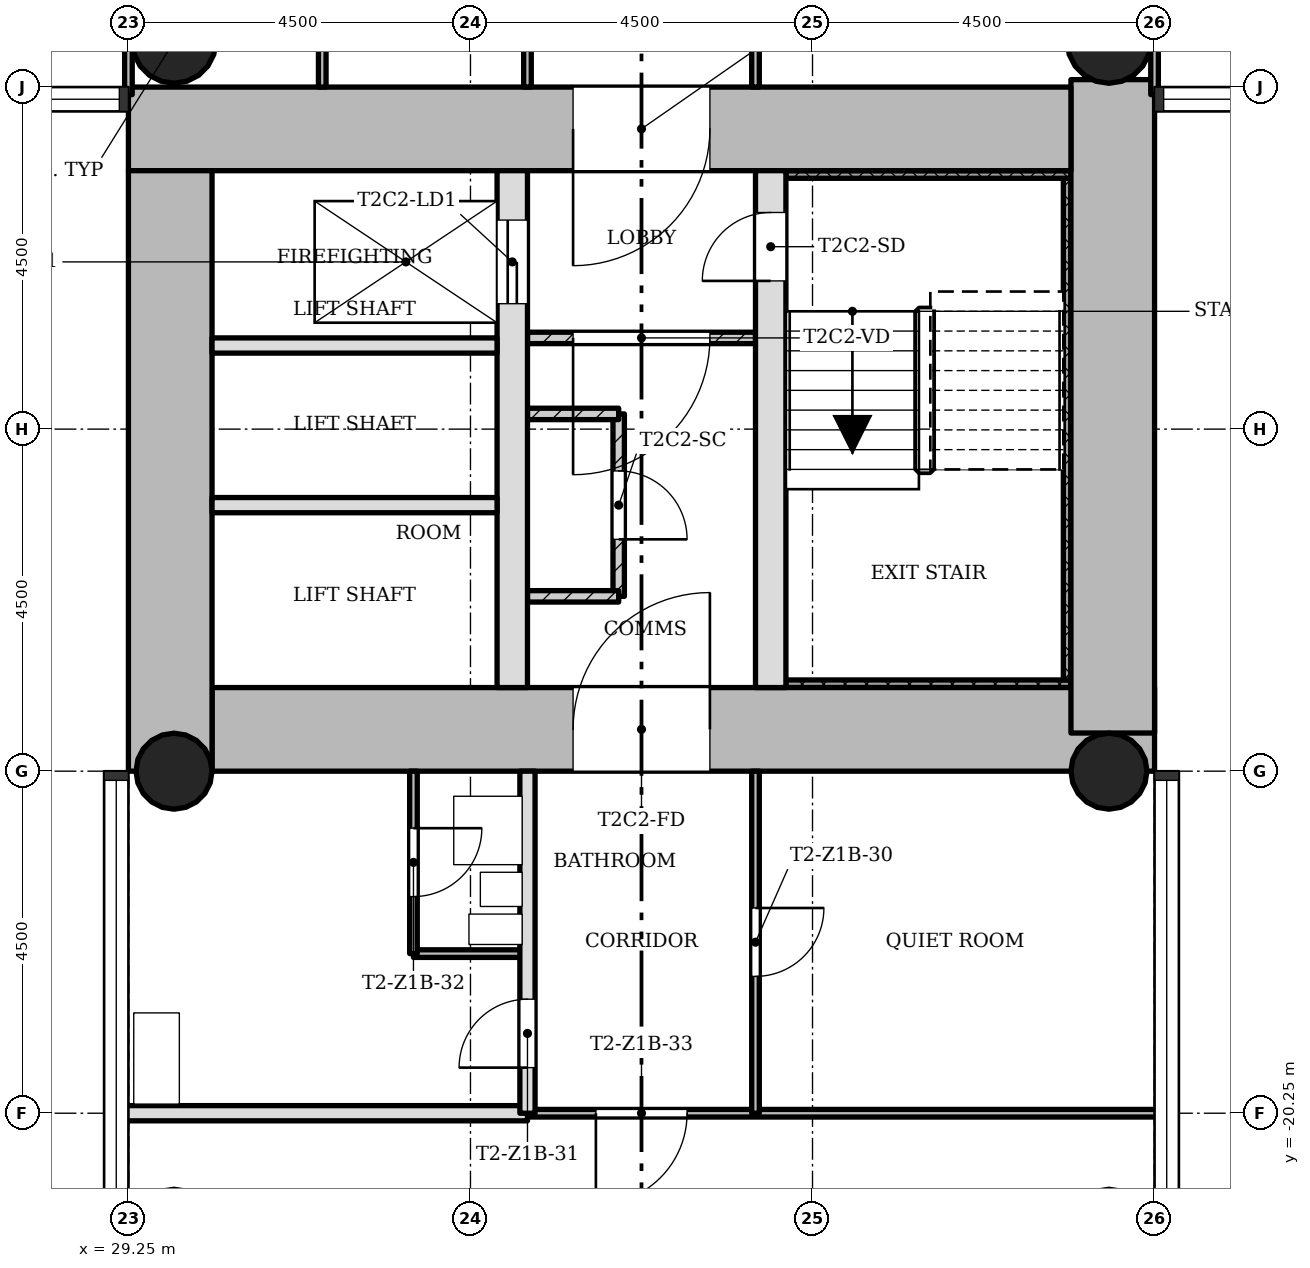
"""IFC4 building model, lengths in metres.
Left out: names, types, materials, properties, quantities, classifications, styles, units other than length and angle.
Written with IfcOpenShell. Run it as: python <this file> out.ifc"""

import sys

from ifc_helpers import new_model, si_unit, direction, frame, frame_2d, origin, origin_2d, place, context, subcontext, project, spatial, rectangle, hollow_circle, extrude, element, fill, save


model = new_model("IFC4")
c1 = context("Model", 3, precision=1e-05, world=origin(), true_north=direction((0.0, 1.0)))
c2 = subcontext(c1, "Body", "Model", "MODEL_VIEW")
j1 = project(units=[si_unit("LENGTHUNIT", "METRE"), si_unit("PLANEANGLEUNIT", "RADIAN")], contexts=[c1])
p1 = place(None, origin())
s1 = spatial("IfcSite", under=j1, at=p1, CompositionType="ELEMENT")
p2 = place(p1, origin())
s2 = spatial("IfcBuilding", under=s1, at=p2, CompositionType="ELEMENT")
p3 = place(p2, frame((0.0, 0.0, 34.7)))
s3 = spatial("IfcBuildingStorey", under=s2, at=p3, CompositionType="ELEMENT", Elevation=34.7)
p4 = place(p3, frame((30.35, -15.2, 0.0), z_axis=(0.0, 0.0, 1.0), x_axis=(1.0, 0.0, 0.0)))
e1 = element("IfcWall", 1, at=p4, inside=s3, PredefinedType="SHEAR", context=c2, shape_type="SweptSolid", body=[
    extrude(rectangle(XDim=12.4, YDim=1.1, at=frame_2d((6.2, 0.0))), origin(), (0.0, 0.0, 1.0), 3.4),
])
p5 = place(p4, frame((4.75, 0.0, 0.0)))
e2 = element("IfcOpeningElement", 2, at=p5, cuts=e1, PredefinedType="OPENING", context=c2, shape_type="SweptSolid", body=[
    extrude(rectangle(XDim=1.8, YDim=2.1, at=frame_2d((0.9, 1.05))), frame((0.0, 0.56, 0.0), z_axis=(0.0, -1.0, 0.0), x_axis=(1.0, 0.0, 0.0)), (0.0, 0.0, 1.0), 1.12),
])
p6 = place(p3, frame((42.2, -15.248, 0.0), z_axis=(0.0, 0.0, 1.0), x_axis=(0.0, 1.0, 0.0)))
e3 = element("IfcWall", 3, at=p6, inside=s3, PredefinedType="SHEAR", context=c2, shape_type="SweptSolid", body=[
    extrude(rectangle(XDim=8.596, YDim=1.1, at=frame_2d((4.298, 0.0))), origin(), (0.0, 0.0, 1.0), 3.4),
])
p7 = place(p3, frame((41.65, -7.3, 0.0), z_axis=(0.0, 0.0, 1.0), x_axis=(-1.0, 0.0, 0.0)))
e4 = element("IfcWall", 4, at=p7, inside=s3, PredefinedType="SHEAR", context=c2, shape_type="SweptSolid", body=[
    extrude(rectangle(XDim=12.4, YDim=1.1, at=frame_2d((6.2, 0.0))), origin(), (0.0, 0.0, 1.0), 3.4),
])
p8 = place(p7, frame((4.75, 0.0, 0.0)))
e5 = element("IfcOpeningElement", 5, at=p8, cuts=e4, PredefinedType="OPENING", context=c2, shape_type="SweptSolid", body=[
    extrude(rectangle(XDim=1.8, YDim=2.1, at=frame_2d((0.9, 1.05))), frame((0.0, 0.56, 0.0), z_axis=(0.0, -1.0, 0.0), x_axis=(1.0, 0.0, 0.0)), (0.0, 0.0, 1.0), 1.12),
])
p9 = place(p3, frame((29.8, -7.85, 0.0), z_axis=(0.0, 0.0, 1.0), x_axis=(0.0, -1.0, 0.0)))
e6 = element("IfcWall", 6, at=p9, inside=s3, PredefinedType="SHEAR", context=c2, shape_type="SweptSolid", body=[
    extrude(rectangle(XDim=7.9, YDim=1.1, at=frame_2d((3.95, 0.0))), origin(), (0.0, 0.0, 1.0), 3.4),
])
p10 = place(p3, frame((34.3, -14.65, 0.0), z_axis=(0.0, 0.0, 1.0), x_axis=(0.0, 1.0, 0.0)))
e7 = element("IfcWall", 7, at=p10, inside=s3, PredefinedType="SHEAR", context=c2, shape_type="SweptSolid", body=[
    extrude(rectangle(XDim=6.8, YDim=0.4, at=frame_2d((3.4, 0.0))), origin(), (0.0, 0.0, 1.0), 3.4),
])
p11 = place(p10, frame((5.05, 0.0, 0.0)))
e8 = element("IfcOpeningElement", 8, at=p11, cuts=e7, PredefinedType="OPENING", context=c2, shape_type="SweptSolid", body=[
    extrude(rectangle(XDim=1.1, YDim=2.1, at=frame_2d((0.55, 1.05))), frame((0.0, 0.21, 0.0), z_axis=(0.0, -1.0, 0.0), x_axis=(1.0, 0.0, 0.0)), (0.0, 0.0, 1.0), 0.42),
])
p12 = place(p3, frame((37.7, -14.65, 0.0), z_axis=(0.0, 0.0, 1.0), x_axis=(0.0, 1.0, 0.0)))
e9 = element("IfcWall", 9, at=p12, inside=s3, PredefinedType="SHEAR", context=c2, shape_type="SweptSolid", body=[
    extrude(rectangle(XDim=6.8, YDim=0.4, at=frame_2d((3.4, 0.0))), origin(), (0.0, 0.0, 1.0), 3.4),
])
p13 = place(p12, frame((5.35, 0.0, 0.0)))
e10 = element("IfcOpeningElement", 10, at=p13, cuts=e9, PredefinedType="OPENING", context=c2, shape_type="SweptSolid", body=[
    extrude(rectangle(XDim=0.9, YDim=2.1, at=frame_2d((0.45, 1.05))), frame((0.0, 0.21, 0.0), z_axis=(0.0, -1.0, 0.0), x_axis=(1.0, 0.0, 0.0)), (0.0, 0.0, 1.0), 0.42),
])
for number, where, z_axis, x_axis in (
    (11, (42.15, -15.75, 0.0), (0.0, 0.0, 1.0), (1.0, 0.0, 0.0)),
    (12, (29.85, -15.75, 0.0), (0.0, 0.0, 1.0), (1.0, 0.0, 0.0)),
):
    element("IfcColumn", number, at=place(p3, frame(where, z_axis=z_axis, x_axis=x_axis)), inside=s3, PredefinedType="COLUMN", context=c2, shape_type="SweptSolid", body=[
        extrude(hollow_circle(Radius=0.5, WallThickness=0.036, at=origin_2d()), origin(), (0.0, 0.0, 1.0), 3.4),
    ])
for number, where, z_axis, x_axis in (
    (13, (42.15, -6.15, 0.0), (0.0, 0.0, 1.0), (1.0, 0.0, 0.0)),
    (14, (29.85, -6.15, 0.0), (0.0, 0.0, 1.0), (1.0, 0.0, 0.0)),
):
    element("IfcColumn", number, at=place(p3, frame(where, z_axis=z_axis, x_axis=x_axis)), inside=s3, PredefinedType="COLUMN", context=c2, shape_type="SweptSolid", body=[
        extrude(hollow_circle(Radius=0.55, WallThickness=0.04, at=origin_2d()), origin(), (0.0, 0.0, 1.0), 3.4),
    ])
p14 = place(p3, frame((34.5, -10.05, 0.0), z_axis=(0.0, 0.0, 1.0), x_axis=(1.0, 0.0, 0.0)))
e15 = element("IfcWall", 15, at=p14, inside=s3, PredefinedType="PARTITIONING", context=c2, shape_type="SweptSolid", body=[
    extrude(rectangle(XDim=3.0, YDim=0.15, at=frame_2d((1.5, 0.0))), origin(), (0.0, 0.0, 1.0), 3.0),
])
p15 = place(p14, frame((0.6, 0.0, 0.0)))
e16 = element("IfcOpeningElement", 16, at=p15, cuts=e15, PredefinedType="OPENING", context=c2, shape_type="SweptSolid", body=[
    extrude(rectangle(XDim=1.8, YDim=2.1, at=frame_2d((0.9, 1.05))), frame((0.0, 0.085, 0.0), z_axis=(0.0, -1.0, 0.0), x_axis=(1.0, 0.0, 0.0)), (0.0, 0.0, 1.0), 0.17),
])
for number, where, z_axis, x_axis in (
    (17, (30.35, -10.15, 0.0), (0.0, 0.0, 1.0), (1.0, 0.0, 0.0)),
    (18, (30.35, -12.25, 0.0), (0.0, 0.0, 1.0), (1.0, 0.0, 0.0)),
):
    element("IfcWall", number, at=place(p3, frame(where, z_axis=z_axis, x_axis=x_axis)), inside=s3, PredefinedType="SOLIDWALL", context=c2, shape_type="SweptSolid", body=[
        extrude(rectangle(XDim=3.75, YDim=0.2, at=frame_2d((1.875, 0.0))), origin(), (0.0, 0.0, 1.0), 3.0),
    ])
p16 = place(p3, frame((35.7, -11.05, 0.0), z_axis=(0.0, 0.0, 1.0), x_axis=(0.0, -1.0, 0.0)))
e19 = element("IfcWall", 19, at=p16, inside=s3, PredefinedType="PARTITIONING", context=c2, shape_type="SweptSolid", body=[
    extrude(rectangle(XDim=2.4, YDim=0.15, at=frame_2d((1.2, 0.0))), origin(), (0.0, 0.0, 1.0), 3.0),
])
p17 = place(p16, frame((0.75, 0.0, 0.0)))
e20 = element("IfcOpeningElement", 20, at=p17, cuts=e19, PredefinedType="OPENING", context=c2, shape_type="SweptSolid", body=[
    extrude(rectangle(XDim=0.9, YDim=2.1, at=frame_2d((0.45, 1.05))), frame((0.0, 0.085, 0.0), z_axis=(0.0, -1.0, 0.0), x_axis=(1.0, 0.0, 0.0)), (0.0, 0.0, 1.0), 0.17),
])
for number, where, z_axis, x_axis in (
    (21, (35.7, -11.05, 0.0), (0.0, 0.0, 1.0), (-1.0, 0.0, 0.0)),
    (22, (35.7, -13.45, 0.0), (0.0, 0.0, 1.0), (-1.0, 0.0, 0.0)),
):
    element("IfcWall", number, at=place(p3, frame(where, z_axis=z_axis, x_axis=x_axis)), inside=s3, PredefinedType="PARTITIONING", context=c2, shape_type="SweptSolid", body=[
        extrude(rectangle(XDim=1.2, YDim=0.15, at=frame_2d((0.6, 0.0))), origin(), (0.0, 0.0, 1.0), 3.0),
    ])
p18 = place(p3, frame((42.85, -20.25, 0.0), z_axis=(0.0, 0.0, 1.0), x_axis=(-1.0, 0.0, 0.0)))
e23 = element("IfcWall", 23, at=p18, inside=s3, PredefinedType="PARTITIONING", context=c2, shape_type="SweptSolid", body=[
    extrude(rectangle(XDim=8.35, YDim=0.1, at=frame_2d((4.175, 0.0))), origin(), (0.0, 0.0, 1.0), 3.0),
])
p19 = place(p18, frame((6.25, 0.0, 0.0)))
e24 = element("IfcOpeningElement", 24, at=p19, cuts=e23, PredefinedType="OPENING", context=c2, shape_type="SweptSolid", body=[
    extrude(rectangle(XDim=1.2, YDim=2.1, at=frame_2d((0.6, 1.05))), frame((0.0, 0.06, 0.0), z_axis=(0.0, -1.0, 0.0), x_axis=(1.0, 0.0, 0.0)), (0.0, 0.0, 1.0), 0.12),
])
p20 = place(p3, frame((34.5, -20.25, 0.0), z_axis=(0.0, 0.0, 1.0), x_axis=(-1.0, 0.0, 0.0)))
e25 = element("IfcWall", 25, at=p20, inside=s3, PredefinedType="SOLIDWALL", context=c2, shape_type="SweptSolid", body=[
    extrude(rectangle(XDim=5.35, YDim=0.2, at=frame_2d((2.675, 0.0))), origin(), (0.0, 0.0, 1.0), 3.0),
])
p21 = place(p3, frame((34.5, -18.15, 0.0), z_axis=(0.0, 0.0, 1.0), x_axis=(-1.0, 0.0, 0.0)))
e26 = element("IfcWall", 26, at=p21, inside=s3, PredefinedType="PARTITIONING", context=c2, shape_type="SweptSolid", body=[
    extrude(rectangle(XDim=1.5, YDim=0.1, at=frame_2d((0.75, 0.0))), origin(), (0.0, 0.0, 1.0), 3.0),
])
p22 = place(p3, frame((42.75, -6.85, 0.0), z_axis=(0.0, 0.0, 1.0), x_axis=(0.0, 1.0, 0.0)))
e27 = element("IfcWall", 27, at=p22, inside=s3, PredefinedType="PARTITIONING", context=c2, shape_type="SweptSolid", body=[
    extrude(rectangle(XDim=5.95, YDim=0.1, at=frame_2d((2.975, 0.0))), origin(), (0.0, 0.0, 1.0), 3.0),
])
p23 = place(p3, frame((37.5, -20.25, 0.0), z_axis=(0.0, 0.0, 1.0), x_axis=(0.0, 1.0, 0.0)))
e28 = element("IfcWall", 28, at=p23, inside=s3, PredefinedType="PARTITIONING", context=c2, shape_type="SweptSolid", body=[
    extrude(rectangle(XDim=4.5, YDim=0.1, at=frame_2d((2.25, 0.0))), origin(), (0.0, 0.0, 1.0), 3.0),
])
p24 = place(p23, frame((1.8, 0.0, 0.0)))
e29 = element("IfcOpeningElement", 29, at=p24, cuts=e28, PredefinedType="OPENING", context=c2, shape_type="SweptSolid", body=[
    extrude(rectangle(XDim=0.9, YDim=2.1, at=frame_2d((0.45, 1.05))), frame((0.0, 0.06, 0.0), z_axis=(0.0, -1.0, 0.0), x_axis=(1.0, 0.0, 0.0)), (0.0, 0.0, 1.0), 0.12),
])
p25 = place(p3, frame((37.5, -6.75, 0.0), z_axis=(0.0, 0.0, 1.0), x_axis=(0.0, 1.0, 0.0)))
e30 = element("IfcWall", 30, at=p25, inside=s3, PredefinedType="PARTITIONING", context=c2, shape_type="SweptSolid", body=[
    extrude(rectangle(XDim=5.85, YDim=0.1, at=frame_2d((2.925, 0.0))), origin(), (0.0, 0.0, 1.0), 3.0),
])
p26 = place(p25, frame((1.575, 0.0, 0.0)))
e31 = element("IfcOpeningElement", 31, at=p26, cuts=e30, PredefinedType="OPENING", context=c2, shape_type="SweptSolid", body=[
    extrude(rectangle(XDim=0.9, YDim=2.1, at=frame_2d((0.45, 1.05))), frame((0.0, 0.06, 0.0), z_axis=(0.0, -1.0, 0.0), x_axis=(1.0, 0.0, 0.0)), (0.0, 0.0, 1.0), 0.12),
])
p27 = place(p3, frame((34.5, -6.75, 0.0), z_axis=(0.0, 0.0, 1.0), x_axis=(0.0, 1.0, 0.0)))
e32 = element("IfcWall", 32, at=p27, inside=s3, PredefinedType="PARTITIONING", context=c2, shape_type="SweptSolid", body=[
    extrude(rectangle(XDim=5.85, YDim=0.1, at=frame_2d((2.925, 0.0))), origin(), (0.0, 0.0, 1.0), 3.0),
])
p28 = place(p27, frame((2.475, 0.0, 0.0)))
e33 = element("IfcOpeningElement", 33, at=p28, cuts=e32, PredefinedType="OPENING", context=c2, shape_type="SweptSolid", body=[
    extrude(rectangle(XDim=0.9, YDim=2.1, at=frame_2d((0.45, 1.05))), frame((0.0, 0.06, 0.0), z_axis=(0.0, -1.0, 0.0), x_axis=(1.0, 0.0, 0.0)), (0.0, 0.0, 1.0), 0.12),
])
p29 = place(p3, frame((34.5, -20.25, 0.0), z_axis=(0.0, 0.0, 1.0), x_axis=(0.0, 1.0, 0.0)))
e34 = element("IfcWall", 34, at=p29, inside=s3, PredefinedType="SOLIDWALL", context=c2, shape_type="SweptSolid", body=[
    extrude(rectangle(XDim=4.5, YDim=0.2, at=frame_2d((2.25, 0.0))), origin(), (0.0, 0.0, 1.0), 3.0),
])
p30 = place(p29, frame((0.6, 0.0, 0.0)))
e35 = element("IfcOpeningElement", 35, at=p30, cuts=e34, PredefinedType="OPENING", context=c2, shape_type="SweptSolid", body=[
    extrude(rectangle(XDim=0.9, YDim=2.1, at=frame_2d((0.45, 1.05))), frame((0.0, 0.11, 0.0), z_axis=(0.0, -1.0, 0.0), x_axis=(1.0, 0.0, 0.0)), (0.0, 0.0, 1.0), 0.22),
])
p31 = place(p3, frame((33.0, -18.15, 0.0), z_axis=(0.0, 0.0, 1.0), x_axis=(0.0, 1.0, 0.0)))
e36 = element("IfcWall", 36, at=p31, inside=s3, PredefinedType="PARTITIONING", context=c2, shape_type="SweptSolid", body=[
    extrude(rectangle(XDim=2.4, YDim=0.1, at=frame_2d((1.2, 0.0))), origin(), (0.0, 0.0, 1.0), 3.0),
])
p32 = place(p31, frame((0.75, 0.0, 0.0)))
e37 = element("IfcOpeningElement", 37, at=p32, cuts=e36, PredefinedType="OPENING", context=c2, shape_type="SweptSolid", body=[
    extrude(rectangle(XDim=0.9, YDim=2.1, at=frame_2d((0.45, 1.05))), frame((0.0, 0.06, 0.0), z_axis=(0.0, -1.0, 0.0), x_axis=(1.0, 0.0, 0.0)), (0.0, 0.0, 1.0), 0.12),
])
p33 = place(p3, frame((31.8, -6.75, 0.0), z_axis=(0.0, 0.0, 1.0), x_axis=(0.0, 1.0, 0.0)))
e38 = element("IfcWall", 38, at=p33, inside=s3, PredefinedType="PARTITIONING", context=c2, shape_type="SweptSolid", body=[
    extrude(rectangle(XDim=5.85, YDim=0.1, at=frame_2d((2.925, 0.0))), origin(), (0.0, 0.0, 1.0), 3.0),
])
p34 = place(p3, frame((29.25, -6.85, 0.0), z_axis=(0.0, 0.0, 1.0), x_axis=(0.0, 1.0, 0.0)))
e39 = element("IfcWall", 39, at=p34, inside=s3, PredefinedType="PARTITIONING", context=c2, shape_type="SweptSolid", body=[
    extrude(rectangle(XDim=5.95, YDim=0.1, at=frame_2d((2.975, 0.0))), origin(), (0.0, 0.0, 1.0), 3.0),
])
p35 = place(p3, frame((37.9, -14.6, 0.0), z_axis=(0.0, 0.0, 1.0), x_axis=(1.0, 0.0, 0.0)))
e40 = element("IfcWall", 40, at=p35, inside=s3, PredefinedType="SHEAR", context=c2, shape_type="SweptSolid", body=[
    extrude(rectangle(XDim=3.75, YDim=0.1, at=frame_2d((1.875, 0.0))), origin(), (0.0, 0.0, 1.0), 3.4),
])
p36 = place(p3, frame((41.6, -7.95, 0.0), z_axis=(0.0, 0.0, 1.0), x_axis=(0.0, -1.0, 0.0)))
e41 = element("IfcWall", 41, at=p36, inside=s3, PredefinedType="SHEAR", context=c2, shape_type="SweptSolid", body=[
    extrude(rectangle(XDim=6.6, YDim=0.1, at=frame_2d((3.3, 0.0))), origin(), (0.0, 0.0, 1.0), 3.4),
])
p37 = place(p3, frame((37.9, -7.9, 0.0), z_axis=(0.0, 0.0, 1.0), x_axis=(1.0, 0.0, 0.0)))
e42 = element("IfcWall", 42, at=p37, inside=s3, PredefinedType="SHEAR", context=c2, shape_type="SweptSolid", body=[
    extrude(rectangle(XDim=3.75, YDim=0.1, at=frame_2d((1.875, 0.0))), origin(), (0.0, 0.0, 1.0), 3.4),
])
p38 = place(p15, origin())
e43 = element("IfcDoor", 43, at=p38, inside=s3, OperationType="SINGLE_SWING_LEFT", PredefinedType="DOOR", context=c2, shape_type="SweptSolid", body=[
    extrude(rectangle(XDim=1.8, YDim=2.1, at=frame_2d((0.9, 1.05))), frame((0.0, 0.025, 0.0), z_axis=(0.0, -1.0, 0.0), x_axis=(1.0, 0.0, 0.0)), (0.0, 0.0, 1.0), 0.05),
])
fill(e16, e43)
p39 = place(p17, origin())
e44 = element("IfcDoor", 44, at=p39, inside=s3, OperationType="SINGLE_SWING_LEFT", PredefinedType="DOOR", context=c2, shape_type="SweptSolid", body=[
    extrude(rectangle(XDim=0.9, YDim=2.1, at=frame_2d((0.45, 1.05))), frame((0.0, 0.025, 0.0), z_axis=(0.0, -1.0, 0.0), x_axis=(1.0, 0.0, 0.0)), (0.0, 0.0, 1.0), 0.05),
])
fill(e20, e44)
p40 = place(p24, origin())
e45 = element("IfcDoor", 45, at=p40, inside=s3, OperationType="SINGLE_SWING_RIGHT", PredefinedType="DOOR", context=c2, shape_type="SweptSolid", body=[
    extrude(rectangle(XDim=0.9, YDim=2.1, at=frame_2d((0.45, 1.05))), frame((0.0, 0.025, 0.0), z_axis=(0.0, -1.0, 0.0), x_axis=(1.0, 0.0, 0.0)), (0.0, 0.0, 1.0), 0.05),
])
fill(e29, e45)
p41 = place(p30, origin())
e46 = element("IfcDoor", 46, at=p41, inside=s3, OperationType="SINGLE_SWING_RIGHT", PredefinedType="DOOR", context=c2, shape_type="SweptSolid", body=[
    extrude(rectangle(XDim=0.9, YDim=2.1, at=frame_2d((0.45, 1.05))), frame((0.0, 0.025, 0.0), z_axis=(0.0, -1.0, 0.0), x_axis=(1.0, 0.0, 0.0)), (0.0, 0.0, 1.0), 0.05),
])
fill(e35, e46)
p42 = place(p32, origin())
e47 = element("IfcDoor", 47, at=p42, inside=s3, OperationType="SINGLE_SWING_RIGHT", PredefinedType="DOOR", context=c2, shape_type="SweptSolid", body=[
    extrude(rectangle(XDim=0.9, YDim=2.1, at=frame_2d((0.45, 1.05))), frame((0.0, 0.025, 0.0), z_axis=(0.0, -1.0, 0.0), x_axis=(1.0, 0.0, 0.0)), (0.0, 0.0, 1.0), 0.05),
])
fill(e37, e47)
p43 = place(p19, origin())
e48 = element("IfcDoor", 48, at=p43, inside=s3, OperationType="SINGLE_SWING_LEFT", PredefinedType="DOOR", context=c2, shape_type="SweptSolid", body=[
    extrude(rectangle(XDim=1.2, YDim=2.1, at=frame_2d((0.6, 1.05))), frame((0.0, 0.025, 0.0), z_axis=(0.0, -1.0, 0.0), x_axis=(1.0, 0.0, 0.0)), (0.0, 0.0, 1.0), 0.05),
])
fill(e24, e48)
p44 = place(p13, origin())
e49 = element("IfcDoor", 49, at=p44, inside=s3, OperationType="SINGLE_SWING_RIGHT", PredefinedType="DOOR", context=c2, shape_type="SweptSolid", body=[
    extrude(rectangle(XDim=0.9, YDim=2.1, at=frame_2d((0.45, 1.05))), frame((0.0, 0.025, 0.0), z_axis=(0.0, -1.0, 0.0), x_axis=(1.0, 0.0, 0.0)), (0.0, 0.0, 1.0), 0.05),
])
fill(e10, e49)
p45 = place(p11, origin())
e50 = element("IfcDoor", 50, at=p45, inside=s3, OperationType="SLIDING_TO_LEFT", PredefinedType="DOOR", context=c2, shape_type="SweptSolid", body=[
    extrude(rectangle(XDim=1.1, YDim=2.1, at=frame_2d((0.55, 1.05))), frame((0.0, 0.025, 0.0), z_axis=(0.0, -1.0, 0.0), x_axis=(1.0, 0.0, 0.0)), (0.0, 0.0, 1.0), 0.05),
])
fill(e8, e50)
p46 = place(p8, origin())
e51 = element("IfcDoor", 51, at=p46, inside=s3, OperationType="SINGLE_SWING_LEFT", PredefinedType="DOOR", context=c2, shape_type="SweptSolid", body=[
    extrude(rectangle(XDim=1.8, YDim=2.1, at=frame_2d((0.9, 1.05))), frame((0.0, 0.025, 0.0), z_axis=(0.0, -1.0, 0.0), x_axis=(1.0, 0.0, 0.0)), (0.0, 0.0, 1.0), 0.05),
])
fill(e5, e51)
p47 = place(p5, origin())
e52 = element("IfcDoor", 52, at=p47, inside=s3, OperationType="SINGLE_SWING_LEFT", PredefinedType="DOOR", context=c2, shape_type="SweptSolid", body=[
    extrude(rectangle(XDim=1.8, YDim=2.1, at=frame_2d((0.9, 1.05))), frame((0.0, 0.025, 0.0), z_axis=(0.0, -1.0, 0.0), x_axis=(1.0, 0.0, 0.0)), (0.0, 0.0, 1.0), 0.05),
])
fill(e2, e52)
save(model, sys.argv[1])
